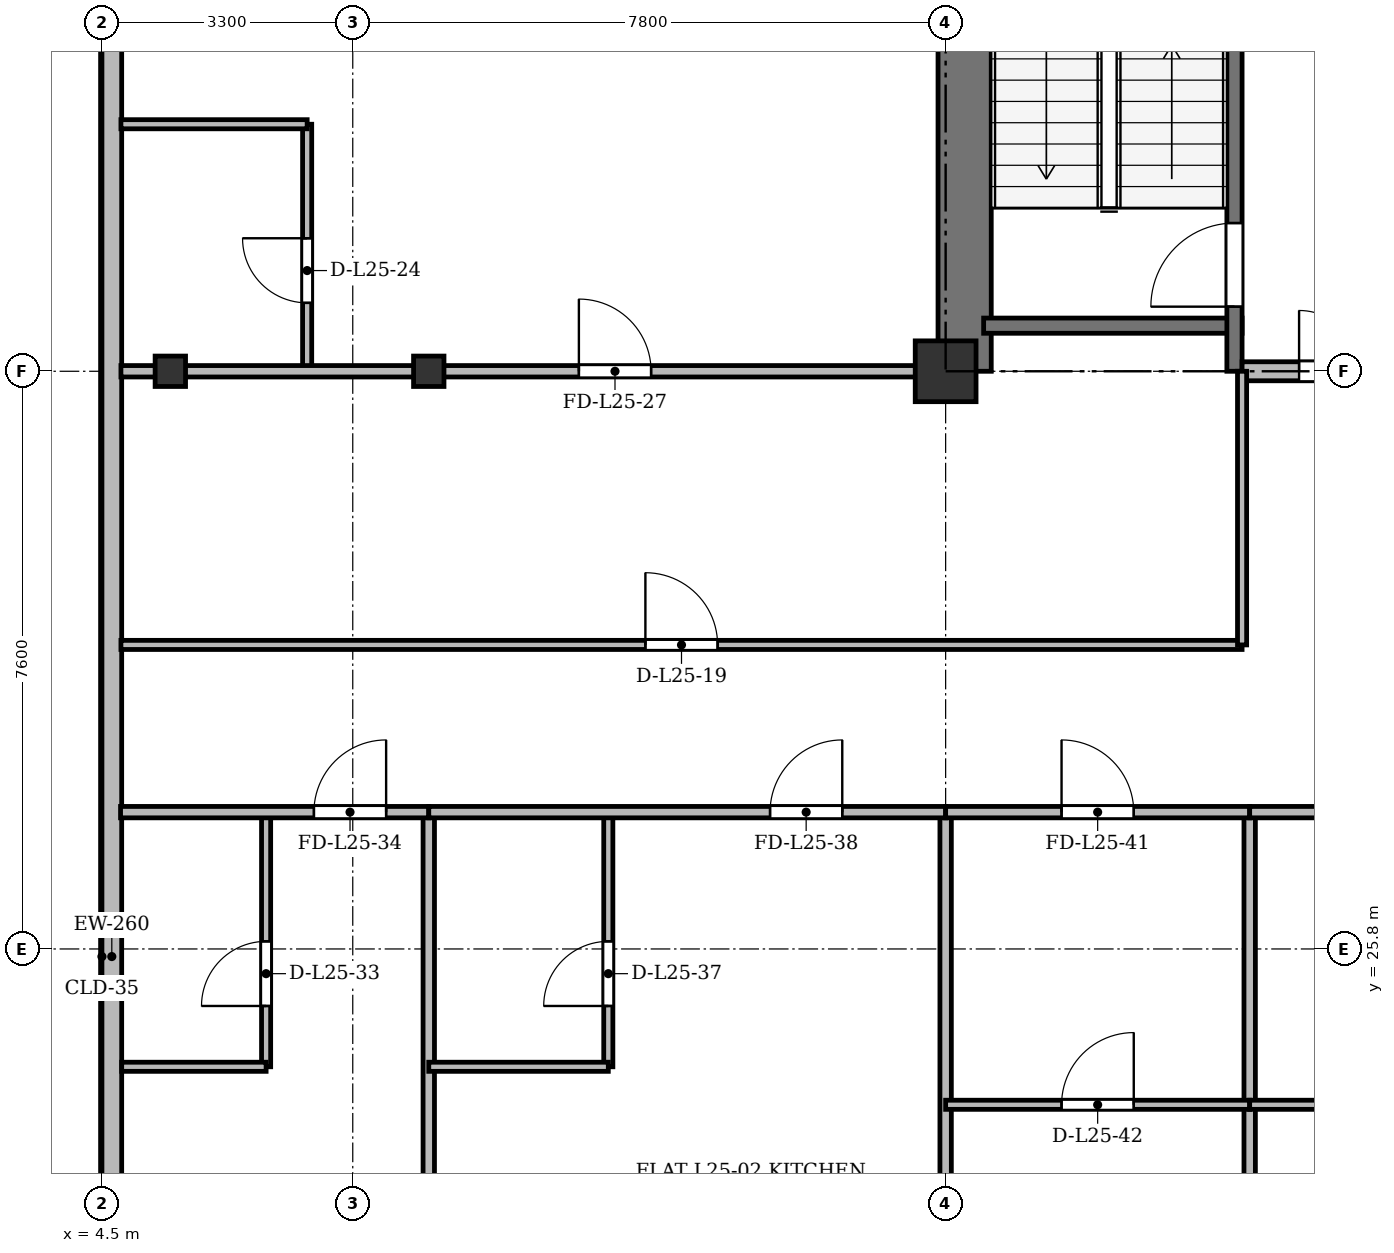
"""IFC4 building model, lengths in metres.
Left out: names, types, materials, properties, quantities, classifications, styles, units other than length and angle.
Written with IfcOpenShell. Run it as: python <this file> out.ifc"""

import sys

from ifc_helpers import new_model, si_unit, direction, frame, frame_2d, origin, origin_2d, place, context, subcontext, project, spatial, rectangle, i_section, extrude, source, transform, mapped, element, fill, save


model = new_model("IFC4")
c1 = context("Model", 3, precision=1e-05, world=origin(), true_north=direction((0.0, 1.0)))
c2 = subcontext(c1, "Body", "Model", "MODEL_VIEW")
j1 = project(units=[si_unit("LENGTHUNIT", "METRE"), si_unit("PLANEANGLEUNIT", "RADIAN")], contexts=[c1])
p1 = place(None, origin())
s1 = spatial("IfcSite", under=j1, at=p1, CompositionType="ELEMENT")
p2 = place(p1, origin())
s2 = spatial("IfcBuilding", under=s1, at=p2, CompositionType="ELEMENT")
p3 = place(p2, frame((0.0, 0.0, 99.7)))
s3 = spatial("IfcBuildingStorey", under=s2, at=p3, CompositionType="ELEMENT", Elevation=99.7)
m1 = source(origin(), c2, "Body", "SweptSolid", [
    extrude(i_section(OverallWidth=0.4, OverallDepth=0.4, WebThickness=0.022, FlangeThickness=0.035, at=origin_2d()), origin(), (0.0, 0.0, 1.0), 3.6),
])
for number, where, z_axis, x_axis in (
    (1, (5.4, 33.4, 0.0), (0.0, 0.0, 1.0), (1.0, 0.0, 0.0)),
    (2, (8.8, 33.4, 0.0), (0.0, 0.0, 1.0), (1.0, 0.0, 0.0)),
):
    element("IfcColumn", number, at=place(p3, frame(where, z_axis=z_axis, x_axis=x_axis)), inside=s3, PredefinedType="COLUMN", context=c2, shape_type="MappedRepresentation", body=[
        mapped(m1, transform((0.0, 0.0, 0.0), x_axis=(1.0, 0.0, 0.0), y_axis=(0.0, 1.0, 0.0), z_axis=(0.0, 0.0, 1.0), scale=1.0)),
    ])
m2 = source(origin(), c2, "Body", "SweptSolid", [
    extrude(rectangle(XDim=0.8, YDim=0.8, at=origin_2d()), origin(), (0.0, 0.0, 1.0), 3.6),
])
p4 = place(p3, frame((15.6, 33.4, 0.0), z_axis=(0.0, 0.0, 1.0), x_axis=(1.0, 0.0, 0.0)))
e3 = element("IfcColumn", 3, at=p4, inside=s3, PredefinedType="COLUMN", context=c2, shape_type="MappedRepresentation", body=[
    mapped(m2, transform((0.0, 0.0, 0.0), x_axis=(1.0, 0.0, 0.0), y_axis=(0.0, 1.0, 0.0), z_axis=(0.0, 0.0, 1.0), scale=1.0)),
])
p5 = place(p3, frame((4.63, 5.9, 0.0), z_axis=(0.0, 0.0, 1.0), x_axis=(0.0, 1.0, 0.0)))
e4 = element("IfcWall", 4, at=p5, inside=s3, PredefinedType="SOLIDWALL", context=c2, shape_type="SweptSolid", body=[
    extrude(rectangle(XDim=39.6, YDim=0.26, at=frame_2d((19.8, 0.0))), origin(), (0.0, 0.0, 1.0), 3.34),
])
p6 = place(p5, frame((1.45, 0.0, 0.92)))
e5 = element("IfcOpeningElement", 5, at=p6, cuts=e4, PredefinedType="OPENING", context=c2, shape_type="SweptSolid", body=[
    extrude(rectangle(XDim=1.2, YDim=1.65, at=frame_2d((0.6, 0.825))), frame((0.0, 0.14, 0.0), z_axis=(0.0, -1.0, 0.0), x_axis=(1.0, 0.0, 0.0)), (0.0, 0.0, 1.0), 0.28),
])
p7 = place(p5, frame((4.3, 0.0, 0.92)))
e6 = element("IfcOpeningElement", 6, at=p7, cuts=e4, PredefinedType="OPENING", context=c2, shape_type="SweptSolid", body=[
    extrude(rectangle(XDim=2.4, YDim=2.1, at=frame_2d((1.2, 1.05))), frame((0.0, 0.14, 0.0), z_axis=(0.0, -1.0, 0.0), x_axis=(1.0, 0.0, 0.0)), (0.0, 0.0, 1.0), 0.28),
])
p8 = place(p5, frame((8.5, 0.0, 0.92)))
e7 = element("IfcOpeningElement", 7, at=p8, cuts=e4, PredefinedType="OPENING", context=c2, shape_type="SweptSolid", body=[
    extrude(rectangle(XDim=2.4, YDim=2.1, at=frame_2d((1.2, 1.05))), frame((0.0, 0.14, 0.0), z_axis=(0.0, -1.0, 0.0), x_axis=(1.0, 0.0, 0.0)), (0.0, 0.0, 1.0), 0.28),
])
p9 = place(p5, frame((33.9, 0.0, 0.92)))
e8 = element("IfcOpeningElement", 8, at=p9, cuts=e4, PredefinedType="OPENING", context=c2, shape_type="SweptSolid", body=[
    extrude(rectangle(XDim=1.2, YDim=1.65, at=frame_2d((0.6, 0.825))), frame((0.0, 0.14, 0.0), z_axis=(0.0, -1.0, 0.0), x_axis=(1.0, 0.0, 0.0)), (0.0, 0.0, 1.0), 0.28),
])
p10 = place(p5, frame((37.25, 0.0, 0.92)))
e9 = element("IfcOpeningElement", 9, at=p10, cuts=e4, PredefinedType="OPENING", context=c2, shape_type="SweptSolid", body=[
    extrude(rectangle(XDim=1.2, YDim=1.65, at=frame_2d((0.6, 0.825))), frame((0.0, 0.14, 0.0), z_axis=(0.0, -1.0, 0.0), x_axis=(1.0, 0.0, 0.0)), (0.0, 0.0, 1.0), 0.28),
])
p11 = place(p3, frame((15.85, 33.4, 0.0), z_axis=(0.0, 0.0, 1.0), x_axis=(0.0, 1.0, 0.0)))
e10 = element("IfcWall", 10, at=p11, inside=s3, PredefinedType="SHEAR", context=c2, shape_type="SweptSolid", body=[
    extrude(rectangle(XDim=11.7, YDim=0.7, at=frame_2d((5.85, 0.0))), origin(), (0.0, 0.0, 1.0), 3.34),
])
p12 = place(p3, frame((16.1, 34.0, 0.0), z_axis=(0.0, 0.0, 1.0), x_axis=(1.0, 0.0, 0.0)))
e11 = element("IfcWall", 11, at=p12, inside=s3, PredefinedType="SHEAR", context=c2, shape_type="SweptSolid", body=[
    extrude(rectangle(XDim=3.4, YDim=0.2, at=frame_2d((1.7, 0.0))), origin(), (0.0, 0.0, 1.0), 3.34),
])
p13 = place(p3, frame((19.4, 33.4, 0.0), z_axis=(0.0, 0.0, 1.0), x_axis=(0.0, 1.0, 0.0)))
e12 = element("IfcWall", 12, at=p13, inside=s3, PredefinedType="SHEAR", context=c2, shape_type="SweptSolid", body=[
    extrude(rectangle(XDim=11.1, YDim=0.2, at=frame_2d((5.55, 0.0))), origin(), (0.0, 0.0, 1.0), 3.34),
])
p14 = place(p13, frame((0.85, 0.0, 0.0)))
e13 = element("IfcOpeningElement", 13, at=p14, cuts=e12, PredefinedType="OPENING", context=c2, shape_type="SweptSolid", body=[
    extrude(rectangle(XDim=1.1, YDim=2.15, at=frame_2d((0.55, 1.075))), frame((0.0, 0.11, 0.0), z_axis=(0.0, -1.0, 0.0), x_axis=(1.0, 0.0, 0.0)), (0.0, 0.0, 1.0), 0.22),
])
p15 = place(p3, frame((19.5, 33.4, 0.0), z_axis=(0.0, 0.0, 1.0), x_axis=(1.0, 0.0, 0.0)))
e14 = element("IfcWall", 14, at=p15, inside=s3, PredefinedType="PARTITIONING", context=c2, shape_type="SweptSolid", body=[
    extrude(rectangle(XDim=6.8, YDim=0.25, at=frame_2d((3.4, 0.0))), origin(), (0.0, 0.0, 1.0), 2.752),
])
p16 = place(p15, frame((0.75, 0.0, 0.0)))
e15 = element("IfcOpeningElement", 15, at=p16, cuts=e14, PredefinedType="OPENING", context=c2, shape_type="SweptSolid", body=[
    extrude(rectangle(XDim=1.6, YDim=2.2, at=frame_2d((0.8, 1.1))), frame((0.0, 0.135, 0.0), z_axis=(0.0, -1.0, 0.0), x_axis=(1.0, 0.0, 0.0)), (0.0, 0.0, 1.0), 0.27),
])
p17 = place(p3, frame((4.75, 29.8, 0.0), z_axis=(0.0, 0.0, 1.0), x_axis=(1.0, 0.0, 0.0)))
e16 = element("IfcWall", 16, at=p17, inside=s3, PredefinedType="PARTITIONING", context=c2, shape_type="SweptSolid", body=[
    extrude(rectangle(XDim=14.75, YDim=0.12, at=frame_2d((7.375, 0.0))), origin(), (0.0, 0.0, 1.0), 2.84),
])
p18 = place(p17, frame((6.9, 0.0, 0.0)))
e17 = element("IfcOpeningElement", 17, at=p18, cuts=e16, PredefinedType="OPENING", context=c2, shape_type="SweptSolid", body=[
    extrude(rectangle(XDim=0.95, YDim=2.15, at=frame_2d((0.475, 1.075))), frame((0.0, 0.07, 0.0), z_axis=(0.0, -1.0, 0.0), x_axis=(1.0, 0.0, 0.0)), (0.0, 0.0, 1.0), 0.14),
])
p19 = place(p3, frame((19.5, 29.8, 0.0), z_axis=(0.0, 0.0, 1.0), x_axis=(0.0, 1.0, 0.0)))
e18 = element("IfcWall", 18, at=p19, inside=s3, PredefinedType="PARTITIONING", context=c2, shape_type="SweptSolid", body=[
    extrude(rectangle(XDim=3.6, YDim=0.12, at=frame_2d((1.8, 0.0))), origin(), (0.0, 0.0, 1.0), 2.752),
])
p20 = place(p3, frame((7.2, 33.4, 0.0), z_axis=(0.0, 0.0, 1.0), x_axis=(0.0, 1.0, 0.0)))
e19 = element("IfcWall", 19, at=p20, inside=s3, PredefinedType="PARTITIONING", context=c2, shape_type="SweptSolid", body=[
    extrude(rectangle(XDim=3.25, YDim=0.12, at=frame_2d((1.625, 0.0))), origin(), (0.0, 0.0, 1.0), 2.752),
])
p21 = place(p20, frame((0.9, 0.0, 0.0)))
e20 = element("IfcOpeningElement", 20, at=p21, cuts=e19, PredefinedType="OPENING", context=c2, shape_type="SweptSolid", body=[
    extrude(rectangle(XDim=0.85, YDim=2.1, at=frame_2d((0.425, 1.05))), frame((0.0, 0.07, 0.0), z_axis=(0.0, -1.0, 0.0), x_axis=(1.0, 0.0, 0.0)), (0.0, 0.0, 1.0), 0.14),
])
p22 = place(p3, frame((4.75, 36.65, 0.0), z_axis=(0.0, 0.0, 1.0), x_axis=(1.0, 0.0, 0.0)))
e21 = element("IfcWall", 21, at=p22, inside=s3, PredefinedType="PARTITIONING", context=c2, shape_type="SweptSolid", body=[
    extrude(rectangle(XDim=2.45, YDim=0.12, at=frame_2d((1.225, 0.0))), origin(), (0.0, 0.0, 1.0), 2.84),
])
p23 = place(p3, frame((4.75, 33.4, 0.0), z_axis=(0.0, 0.0, 1.0), x_axis=(1.0, 0.0, 0.0)))
e22 = element("IfcWall", 22, at=p23, inside=s3, PredefinedType="PARTITIONING", context=c2, shape_type="SweptSolid", body=[
    extrude(rectangle(XDim=10.85, YDim=0.15, at=frame_2d((5.425, 0.0))), origin(), (0.0, 0.0, 1.0), 2.752),
])
p24 = place(p23, frame((6.025, 0.0, 0.0)))
e23 = element("IfcOpeningElement", 23, at=p24, cuts=e22, PredefinedType="OPENING", context=c2, shape_type="SweptSolid", body=[
    extrude(rectangle(XDim=0.95, YDim=2.15, at=frame_2d((0.475, 1.075))), frame((0.0, 0.085, 0.0), z_axis=(0.0, -1.0, 0.0), x_axis=(1.0, 0.0, 0.0)), (0.0, 0.0, 1.0), 0.17),
])
for number, where, z_axis, x_axis in (
    (24, (8.8, 3.145, 0.0), (0.0, 0.0, 1.0), (0.0, 1.0, 0.0)),
    (25, (15.6, 3.145, 0.0), (0.0, 0.0, 1.0), (0.0, 1.0, 0.0)),
):
    element("IfcWall", number, at=place(p3, frame(where, z_axis=z_axis, x_axis=x_axis)), inside=s3, PredefinedType="PARTITIONING", context=c2, shape_type="SweptSolid", body=[
        extrude(rectangle(XDim=24.455, YDim=0.15, at=frame_2d((12.228, 0.0))), origin(), (0.0, 0.0, 1.0), 2.84),
    ])
p25 = place(p3, frame((19.6, 3.145, 0.0), z_axis=(0.0, 0.0, 1.0), x_axis=(0.0, 1.0, 0.0)))
e26 = element("IfcWall", 26, at=p25, inside=s3, PredefinedType="PARTITIONING", context=c2, shape_type="SweptSolid", body=[
    extrude(rectangle(XDim=24.455, YDim=0.15, at=frame_2d((12.228, 0.0))), origin(), (0.0, 0.0, 1.0), 2.752),
])
p26 = place(p3, frame((6.66, 24.25, 0.0), z_axis=(0.0, 0.0, 1.0), x_axis=(0.0, 1.0, 0.0)))
e27 = element("IfcWall", 27, at=p26, inside=s3, PredefinedType="PARTITIONING", context=c2, shape_type="SweptSolid", body=[
    extrude(rectangle(XDim=3.35, YDim=0.12, at=frame_2d((1.675, 0.0))), origin(), (0.0, 0.0, 1.0), 2.99),
])
p27 = place(p26, frame((0.8, 0.0, 0.0)))
e28 = element("IfcOpeningElement", 28, at=p27, cuts=e27, PredefinedType="OPENING", context=c2, shape_type="SweptSolid", body=[
    extrude(rectangle(XDim=0.85, YDim=2.1, at=frame_2d((0.425, 1.05))), frame((0.0, 0.07, 0.0), z_axis=(0.0, -1.0, 0.0), x_axis=(1.0, 0.0, 0.0)), (0.0, 0.0, 1.0), 0.14),
])
p28 = place(p3, frame((4.76, 24.25, 0.0), z_axis=(0.0, 0.0, 1.0), x_axis=(1.0, 0.0, 0.0)))
e29 = element("IfcWall", 29, at=p28, inside=s3, PredefinedType="PARTITIONING", context=c2, shape_type="SweptSolid", body=[
    extrude(rectangle(XDim=1.9, YDim=0.12, at=frame_2d((0.95, 0.0))), origin(), (0.0, 0.0, 1.0), 2.84),
])
p29 = place(p3, frame((4.745, 27.6, 0.0), z_axis=(0.0, 0.0, 1.0), x_axis=(1.0, 0.0, 0.0)))
e30 = element("IfcWall", 30, at=p29, inside=s3, PredefinedType="PARTITIONING", context=c2, shape_type="SweptSolid", body=[
    extrude(rectangle(XDim=4.055, YDim=0.15, at=frame_2d((2.027, 0.0))), origin(), (0.0, 0.0, 1.0), 2.84),
])
p30 = place(p29, frame((2.544, 0.0, 0.0)))
e31 = element("IfcOpeningElement", 31, at=p30, cuts=e30, PredefinedType="OPENING", context=c2, shape_type="SweptSolid", body=[
    extrude(rectangle(XDim=0.95, YDim=2.15, at=frame_2d((0.475, 1.075))), frame((0.0, 0.085, 0.0), z_axis=(0.0, -1.0, 0.0), x_axis=(1.0, 0.0, 0.0)), (0.0, 0.0, 1.0), 0.17),
])
p31 = place(p3, frame((11.162, 24.25, 0.0), z_axis=(0.0, 0.0, 1.0), x_axis=(0.0, 1.0, 0.0)))
e32 = element("IfcWall", 32, at=p31, inside=s3, PredefinedType="PARTITIONING", context=c2, shape_type="SweptSolid", body=[
    extrude(rectangle(XDim=3.35, YDim=0.12, at=frame_2d((1.675, 0.0))), origin(), (0.0, 0.0, 1.0), 2.99),
])
p32 = place(p31, frame((0.8, 0.0, 0.0)))
e33 = element("IfcOpeningElement", 33, at=p32, cuts=e32, PredefinedType="OPENING", context=c2, shape_type="SweptSolid", body=[
    extrude(rectangle(XDim=0.85, YDim=2.1, at=frame_2d((0.425, 1.05))), frame((0.0, 0.07, 0.0), z_axis=(0.0, -1.0, 0.0), x_axis=(1.0, 0.0, 0.0)), (0.0, 0.0, 1.0), 0.14),
])
p33 = place(p3, frame((8.8, 24.25, 0.0), z_axis=(0.0, 0.0, 1.0), x_axis=(1.0, 0.0, 0.0)))
e34 = element("IfcWall", 34, at=p33, inside=s3, PredefinedType="PARTITIONING", context=c2, shape_type="SweptSolid", body=[
    extrude(rectangle(XDim=2.362, YDim=0.12, at=frame_2d((1.181, 0.0))), origin(), (0.0, 0.0, 1.0), 2.84),
])
p34 = place(p3, frame((8.8, 27.6, 0.0), z_axis=(0.0, 0.0, 1.0), x_axis=(1.0, 0.0, 0.0)))
e35 = element("IfcWall", 35, at=p34, inside=s3, PredefinedType="PARTITIONING", context=c2, shape_type="SweptSolid", body=[
    extrude(rectangle(XDim=6.8, YDim=0.15, at=frame_2d((3.4, 0.0))), origin(), (0.0, 0.0, 1.0), 2.84),
])
p35 = place(p34, frame((4.49, 0.0, 0.0)))
e36 = element("IfcOpeningElement", 36, at=p35, cuts=e35, PredefinedType="OPENING", context=c2, shape_type="SweptSolid", body=[
    extrude(rectangle(XDim=0.95, YDim=2.15, at=frame_2d((0.475, 1.075))), frame((0.0, 0.085, 0.0), z_axis=(0.0, -1.0, 0.0), x_axis=(1.0, 0.0, 0.0)), (0.0, 0.0, 1.0), 0.17),
])
p36 = place(p3, frame((15.6, 27.6, 0.0), z_axis=(0.0, 0.0, 1.0), x_axis=(1.0, 0.0, 0.0)))
e37 = element("IfcWall", 37, at=p36, inside=s3, PredefinedType="PARTITIONING", context=c2, shape_type="SweptSolid", body=[
    extrude(rectangle(XDim=4.0, YDim=0.15, at=frame_2d((2.0, 0.0))), origin(), (0.0, 0.0, 1.0), 2.84),
])
p37 = place(p36, frame((1.525, 0.0, 0.0)))
e38 = element("IfcOpeningElement", 38, at=p37, cuts=e37, PredefinedType="OPENING", context=c2, shape_type="SweptSolid", body=[
    extrude(rectangle(XDim=0.95, YDim=2.15, at=frame_2d((0.475, 1.075))), frame((0.0, 0.085, 0.0), z_axis=(0.0, -1.0, 0.0), x_axis=(1.0, 0.0, 0.0)), (0.0, 0.0, 1.0), 0.17),
])
p38 = place(p3, frame((15.6, 23.75, 0.0), z_axis=(0.0, 0.0, 1.0), x_axis=(1.0, 0.0, 0.0)))
e39 = element("IfcWall", 39, at=p38, inside=s3, PredefinedType="PARTITIONING", context=c2, shape_type="SweptSolid", body=[
    extrude(rectangle(XDim=4.0, YDim=0.12, at=frame_2d((2.0, 0.0))), origin(), (0.0, 0.0, 1.0), 2.84),
])
p39 = place(p38, frame((1.525, 0.0, 0.0)))
e40 = element("IfcOpeningElement", 40, at=p39, cuts=e39, PredefinedType="OPENING", context=c2, shape_type="SweptSolid", body=[
    extrude(rectangle(XDim=0.95, YDim=2.15, at=frame_2d((0.475, 1.075))), frame((0.0, 0.07, 0.0), z_axis=(0.0, -1.0, 0.0), x_axis=(1.0, 0.0, 0.0)), (0.0, 0.0, 1.0), 0.14),
])
p40 = place(p3, frame((19.6, 27.6, 0.0), z_axis=(0.0, 0.0, 1.0), x_axis=(1.0, 0.0, 0.0)))
e41 = element("IfcWall", 41, at=p40, inside=s3, PredefinedType="PARTITIONING", context=c2, shape_type="SweptSolid", body=[
    extrude(rectangle(XDim=3.8, YDim=0.15, at=frame_2d((1.9, 0.0))), origin(), (0.0, 0.0, 1.0), 2.84),
])
p41 = place(p40, frame((1.33, 0.0, 0.0)))
e42 = element("IfcOpeningElement", 42, at=p41, cuts=e41, PredefinedType="OPENING", context=c2, shape_type="SweptSolid", body=[
    extrude(rectangle(XDim=0.95, YDim=2.15, at=frame_2d((0.475, 1.075))), frame((0.0, 0.085, 0.0), z_axis=(0.0, -1.0, 0.0), x_axis=(1.0, 0.0, 0.0)), (0.0, 0.0, 1.0), 0.17),
])
p42 = place(p3, frame((19.6, 23.75, 0.0), z_axis=(0.0, 0.0, 1.0), x_axis=(1.0, 0.0, 0.0)))
e43 = element("IfcWall", 43, at=p42, inside=s3, PredefinedType="PARTITIONING", context=c2, shape_type="SweptSolid", body=[
    extrude(rectangle(XDim=3.8, YDim=0.12, at=frame_2d((1.9, 0.0))), origin(), (0.0, 0.0, 1.0), 2.84),
])
p43 = place(p42, frame((1.33, 0.0, 0.0)))
e44 = element("IfcOpeningElement", 44, at=p43, cuts=e43, PredefinedType="OPENING", context=c2, shape_type="SweptSolid", body=[
    extrude(rectangle(XDim=0.95, YDim=2.15, at=frame_2d((0.475, 1.075))), frame((0.0, 0.07, 0.0), z_axis=(0.0, -1.0, 0.0), x_axis=(1.0, 0.0, 0.0)), (0.0, 0.0, 1.0), 0.14),
])
m3 = source(origin(), c2, "Body", "SweptSolid", [
    extrude(rectangle(XDim=1.1, YDim=2.15, at=frame_2d((0.55, 1.075))), frame((0.0, 0.025, 0.0), z_axis=(0.0, -1.0, 0.0), x_axis=(1.0, 0.0, 0.0)), (0.0, 0.0, 1.0), 0.05),
])
p44 = place(p14, origin())
e45 = element("IfcDoor", 45, at=p44, inside=s3, OperationType="SINGLE_SWING_LEFT", PredefinedType="DOOR", context=c2, shape_type="MappedRepresentation", body=[
    mapped(m3, transform((0.0, 0.0, 0.0), x_axis=(1.0, 0.0, 0.0), y_axis=(0.0, 1.0, 0.0), z_axis=(0.0, 0.0, 1.0), scale=1.0)),
])
fill(e13, e45)
m4 = source(origin(), c2, "Body", "SweptSolid", [
    extrude(rectangle(XDim=1.6, YDim=2.2, at=frame_2d((0.8, 1.1))), frame((0.0, 0.025, 0.0), z_axis=(0.0, -1.0, 0.0), x_axis=(1.0, 0.0, 0.0)), (0.0, 0.0, 1.0), 0.05),
])
p45 = place(p16, origin())
e46 = element("IfcDoor", 46, at=p45, inside=s3, OperationType="DOUBLE_DOOR_SINGLE_SWING", PredefinedType="DOOR", context=c2, shape_type="MappedRepresentation", body=[
    mapped(m4, transform((0.0, 0.0, 0.0), x_axis=(1.0, 0.0, 0.0), y_axis=(0.0, 1.0, 0.0), z_axis=(0.0, 0.0, 1.0), scale=1.0)),
])
fill(e15, e46)
m5 = source(origin(), c2, "Body", "SweptSolid", [
    extrude(rectangle(XDim=0.95, YDim=2.15, at=frame_2d((0.475, 1.075))), frame((0.0, 0.025, 0.0), z_axis=(0.0, -1.0, 0.0), x_axis=(1.0, 0.0, 0.0)), (0.0, 0.0, 1.0), 0.05),
])
p46 = place(p18, origin())
e47 = element("IfcDoor", 47, at=p46, inside=s3, OperationType="SINGLE_SWING_LEFT", PredefinedType="DOOR", context=c2, shape_type="MappedRepresentation", body=[
    mapped(m5, transform((0.0, 0.0, 0.0), x_axis=(1.0, 0.0, 0.0), y_axis=(0.0, 1.0, 0.0), z_axis=(0.0, 0.0, 1.0), scale=1.0)),
])
fill(e17, e47)
m6 = source(origin(), c2, "Body", "SweptSolid", [
    extrude(rectangle(XDim=0.85, YDim=2.1, at=frame_2d((0.425, 1.05))), frame((0.0, 0.025, 0.0), z_axis=(0.0, -1.0, 0.0), x_axis=(1.0, 0.0, 0.0)), (0.0, 0.0, 1.0), 0.05),
])
p47 = place(p21, origin())
e48 = element("IfcDoor", 48, at=p47, inside=s3, OperationType="SINGLE_SWING_RIGHT", PredefinedType="DOOR", context=c2, shape_type="MappedRepresentation", body=[
    mapped(m6, transform((0.0, 0.0, 0.0), x_axis=(1.0, 0.0, 0.0), y_axis=(0.0, 1.0, 0.0), z_axis=(0.0, 0.0, 1.0), scale=1.0)),
])
fill(e20, e48)
p48 = place(p24, origin())
e49 = element("IfcDoor", 49, at=p48, inside=s3, OperationType="SINGLE_SWING_LEFT", PredefinedType="DOOR", context=c2, shape_type="MappedRepresentation", body=[
    mapped(m5, transform((0.0, 0.0, 0.0), x_axis=(1.0, 0.0, 0.0), y_axis=(0.0, 1.0, 0.0), z_axis=(0.0, 0.0, 1.0), scale=1.0)),
])
fill(e23, e49)
p49 = place(p27, origin())
e50 = element("IfcDoor", 50, at=p49, inside=s3, OperationType="SINGLE_SWING_LEFT", PredefinedType="DOOR", context=c2, shape_type="MappedRepresentation", body=[
    mapped(m6, transform((0.0, 0.0, 0.0), x_axis=(1.0, 0.0, 0.0), y_axis=(0.0, 1.0, 0.0), z_axis=(0.0, 0.0, 1.0), scale=1.0)),
])
fill(e28, e50)
p50 = place(p30, origin())
e51 = element("IfcDoor", 51, at=p50, inside=s3, OperationType="SINGLE_SWING_RIGHT", PredefinedType="DOOR", context=c2, shape_type="MappedRepresentation", body=[
    mapped(m5, transform((0.0, 0.0, 0.0), x_axis=(1.0, 0.0, 0.0), y_axis=(0.0, 1.0, 0.0), z_axis=(0.0, 0.0, 1.0), scale=1.0)),
])
fill(e31, e51)
p51 = place(p32, origin())
e52 = element("IfcDoor", 52, at=p51, inside=s3, OperationType="SINGLE_SWING_LEFT", PredefinedType="DOOR", context=c2, shape_type="MappedRepresentation", body=[
    mapped(m6, transform((0.0, 0.0, 0.0), x_axis=(1.0, 0.0, 0.0), y_axis=(0.0, 1.0, 0.0), z_axis=(0.0, 0.0, 1.0), scale=1.0)),
])
fill(e33, e52)
p52 = place(p35, origin())
e53 = element("IfcDoor", 53, at=p52, inside=s3, OperationType="SINGLE_SWING_RIGHT", PredefinedType="DOOR", context=c2, shape_type="MappedRepresentation", body=[
    mapped(m5, transform((0.0, 0.0, 0.0), x_axis=(1.0, 0.0, 0.0), y_axis=(0.0, 1.0, 0.0), z_axis=(0.0, 0.0, 1.0), scale=1.0)),
])
fill(e36, e53)
p53 = place(p37, origin())
e54 = element("IfcDoor", 54, at=p53, inside=s3, OperationType="SINGLE_SWING_LEFT", PredefinedType="DOOR", context=c2, shape_type="MappedRepresentation", body=[
    mapped(m5, transform((0.0, 0.0, 0.0), x_axis=(1.0, 0.0, 0.0), y_axis=(0.0, 1.0, 0.0), z_axis=(0.0, 0.0, 1.0), scale=1.0)),
])
fill(e38, e54)
p54 = place(p39, origin())
e55 = element("IfcDoor", 55, at=p54, inside=s3, OperationType="SINGLE_SWING_RIGHT", PredefinedType="DOOR", context=c2, shape_type="MappedRepresentation", body=[
    mapped(m5, transform((0.0, 0.0, 0.0), x_axis=(1.0, 0.0, 0.0), y_axis=(0.0, 1.0, 0.0), z_axis=(0.0, 0.0, 1.0), scale=1.0)),
])
fill(e40, e55)
save(model, sys.argv[1])
